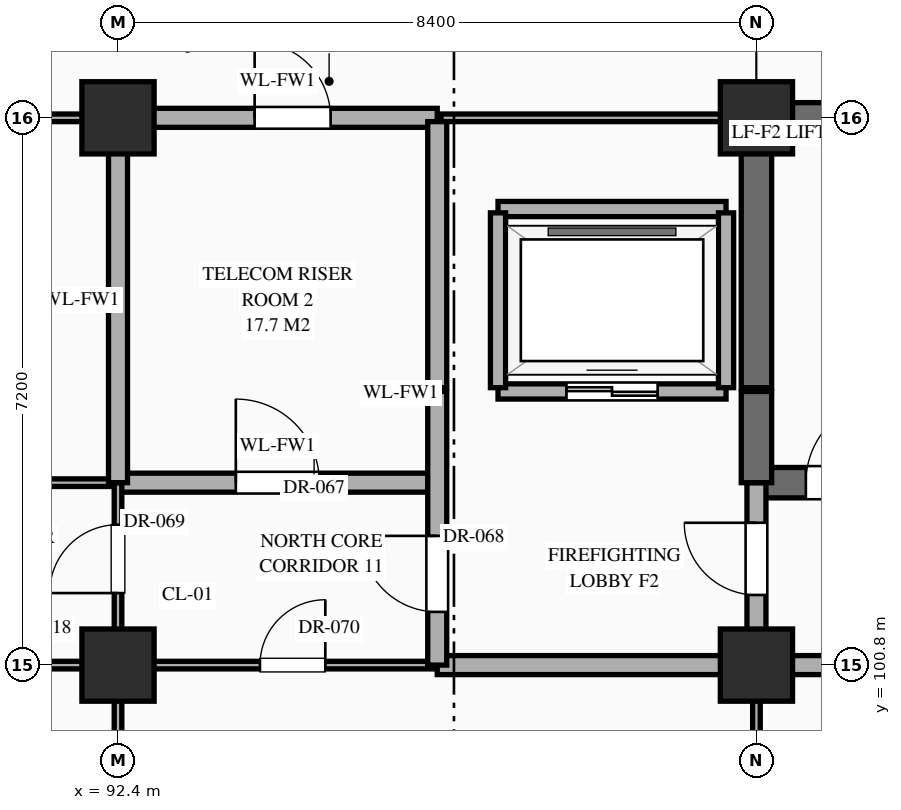
"""IFC4 building model, lengths in metres.
Left out: names, types, materials, properties, quantities, classifications, styles, units other than length and angle.
Written with IfcOpenShell. Run it as: python <this file> out.ifc"""

import sys

from ifc_helpers import new_model, si_unit, direction, frame, frame_2d, origin, origin_2d, place, context, subcontext, project, spatial, rectangle, extrude, element, fill, save


model = new_model("IFC4")
c1 = context("Model", 3, precision=1e-05, world=origin(), true_north=direction((0.0, 1.0)))
c2 = subcontext(c1, "Body", "Model", "MODEL_VIEW")
j1 = project(units=[si_unit("LENGTHUNIT", "METRE"), si_unit("PLANEANGLEUNIT", "RADIAN")], contexts=[c1])
p1 = place(None, origin())
s1 = spatial("IfcSite", under=j1, at=p1, CompositionType="ELEMENT")
p2 = place(p1, origin())
s2 = spatial("IfcBuilding", under=s1, at=p2, CompositionType="ELEMENT")
p3 = place(p2, frame((0.0, 0.0, -10.2)))
s3 = spatial("IfcBuildingStorey", under=s2, at=p3, CompositionType="ELEMENT", Elevation=-10.2)
for number, where, z_axis, x_axis in (
    (1, (92.4, 100.8, 0.0), (0.0, 0.0, 1.0), (1.0, 0.0, 0.0)),
    (2, (92.4, 108.0, 0.0), (0.0, 0.0, 1.0), (1.0, 0.0, 0.0)),
    (3, (100.8, 100.8, 0.0), (0.0, 0.0, 1.0), (1.0, 0.0, 0.0)),
    (4, (100.8, 108.0, 0.0), (0.0, 0.0, 1.0), (1.0, 0.0, 0.0)),
):
    element("IfcColumn", number, at=place(p3, frame(where, z_axis=z_axis, x_axis=x_axis)), inside=s3, PredefinedType="COLUMN", context=c2, shape_type="SweptSolid", body=[
        extrude(rectangle(XDim=0.95, YDim=0.95, at=origin_2d()), origin(), (0.0, 0.0, 1.0), 4.8),
    ])
p4 = place(p3, frame((71.4, 100.8, 0.0), z_axis=(0.0, 0.0, 1.0), x_axis=(1.0, 0.0, 0.0)))
e5 = element("IfcWall", 5, at=p4, inside=s3, PredefinedType="STANDARD", context=c2, shape_type="SweptSolid", body=[
    extrude(rectangle(XDim=25.2, YDim=0.1, at=frame_2d((12.6, 0.0))), origin(), (0.0, 0.0, 1.0), 3.63),
])
p5 = place(p4, frame((1.413, 0.0, 0.0)))
e6 = element("IfcOpeningElement", 6, at=p5, cuts=e5, PredefinedType="OPENING", context=c2, shape_type="SweptSolid", body=[
    extrude(rectangle(XDim=0.98, YDim=2.35, at=frame_2d((0.49, 1.175))), frame((0.0, 0.062, 0.0), z_axis=(0.0, -1.0, 0.0), x_axis=(1.0, 0.0, 0.0)), (0.0, 0.0, 1.0), 0.124),
])
p6 = place(p4, frame((22.867, 0.0, 0.0)))
e7 = element("IfcOpeningElement", 7, at=p6, cuts=e5, PredefinedType="OPENING", context=c2, shape_type="SweptSolid", body=[
    extrude(rectangle(XDim=0.86, YDim=2.1, at=frame_2d((0.43, 1.05))), frame((0.0, 0.062, 0.0), z_axis=(0.0, -1.0, 0.0), x_axis=(1.0, 0.0, 0.0)), (0.0, 0.0, 1.0), 0.124),
])
p7 = place(p4, frame((7.84, 0.0, 0.0)))
e8 = element("IfcOpeningElement", 8, at=p7, cuts=e5, PredefinedType="OPENING", context=c2, shape_type="SweptSolid", body=[
    extrude(rectangle(XDim=1.12, YDim=2.25, at=frame_2d((0.56, 1.125))), frame((0.0, 0.062, 0.0), z_axis=(0.0, -1.0, 0.0), x_axis=(1.0, 0.0, 0.0)), (0.0, 0.0, 1.0), 0.124),
])
p8 = place(p4, frame((14.008, 0.0, 0.0)))
e9 = element("IfcOpeningElement", 9, at=p8, cuts=e5, PredefinedType="OPENING", context=c2, shape_type="SweptSolid", body=[
    extrude(rectangle(XDim=0.98, YDim=2.35, at=frame_2d((0.49, 1.175))), frame((0.0, 0.062, 0.0), z_axis=(0.0, -1.0, 0.0), x_axis=(1.0, 0.0, 0.0)), (0.0, 0.0, 1.0), 0.124),
])
p9 = place(p4, frame((16.69, 0.0, 0.0)))
e10 = element("IfcOpeningElement", 10, at=p9, cuts=e5, PredefinedType="OPENING", context=c2, shape_type="SweptSolid", body=[
    extrude(rectangle(XDim=1.02, YDim=2.4, at=frame_2d((0.51, 1.2))), frame((0.0, 0.062, 0.0), z_axis=(0.0, -1.0, 0.0), x_axis=(1.0, 0.0, 0.0)), (0.0, 0.0, 1.0), 0.124),
])
p10 = place(p4, frame((18.972, 0.0, 0.0)))
e11 = element("IfcOpeningElement", 11, at=p10, cuts=e5, PredefinedType="OPENING", context=c2, shape_type="SweptSolid", body=[
    extrude(rectangle(XDim=1.06, YDim=2.4, at=frame_2d((0.53, 1.2))), frame((0.0, 0.062, 0.0), z_axis=(0.0, -1.0, 0.0), x_axis=(1.0, 0.0, 0.0)), (0.0, 0.0, 1.0), 0.124),
])
p11 = place(p3, frame((96.6, 100.8, 0.0), z_axis=(0.0, 0.0, 1.0), x_axis=(1.0, 0.0, 0.0)))
e12 = element("IfcWall", 12, at=p11, inside=s3, PredefinedType="STANDARD", context=c2, shape_type="SweptSolid", body=[
    extrude(rectangle(XDim=12.6, YDim=0.25, at=frame_2d((6.3, 0.0))), origin(), (0.0, 0.0, 1.0), 3.63),
])
p12 = place(p11, frame((7.9, 0.0, 0.0)))
e13 = element("IfcOpeningElement", 13, at=p12, cuts=e12, PredefinedType="OPENING", context=c2, shape_type="SweptSolid", body=[
    extrude(rectangle(XDim=1.0, YDim=2.2, at=frame_2d((0.5, 1.1))), frame((0.0, 0.137, 0.0), z_axis=(0.0, -1.0, 0.0), x_axis=(1.0, 0.0, 0.0)), (0.0, 0.0, 1.0), 0.274),
])
p13 = place(p3, frame((75.6, 103.2, 0.0), z_axis=(0.0, 0.0, 1.0), x_axis=(1.0, 0.0, 0.0)))
e14 = element("IfcWall", 14, at=p13, inside=s3, PredefinedType="STANDARD", context=c2, shape_type="SweptSolid", body=[
    extrude(rectangle(XDim=16.8, YDim=0.1, at=frame_2d((8.4, 0.0))), origin(), (0.0, 0.0, 1.0), 4.48),
])
p14 = place(p13, frame((0.88, 0.0, 0.0)))
e15 = element("IfcOpeningElement", 15, at=p14, cuts=e14, PredefinedType="OPENING", context=c2, shape_type="SweptSolid", body=[
    extrude(rectangle(XDim=1.04, YDim=2.2, at=frame_2d((0.52, 1.1))), frame((0.0, 0.062, 0.0), z_axis=(0.0, -1.0, 0.0), x_axis=(1.0, 0.0, 0.0)), (0.0, 0.0, 1.0), 0.124),
])
p15 = place(p13, frame((3.62, 0.0, 0.0)))
e16 = element("IfcOpeningElement", 16, at=p15, cuts=e14, PredefinedType="OPENING", context=c2, shape_type="SweptSolid", body=[
    extrude(rectangle(XDim=1.16, YDim=2.3, at=frame_2d((0.58, 1.15))), frame((0.0, 0.062, 0.0), z_axis=(0.0, -1.0, 0.0), x_axis=(1.0, 0.0, 0.0)), (0.0, 0.0, 1.0), 0.124),
])
p16 = place(p13, frame((6.4, 0.0, 0.0)))
e17 = element("IfcOpeningElement", 17, at=p16, cuts=e14, PredefinedType="OPENING", context=c2, shape_type="SweptSolid", body=[
    extrude(rectangle(XDim=1.2, YDim=2.35, at=frame_2d((0.6, 1.175))), frame((0.0, 0.062, 0.0), z_axis=(0.0, -1.0, 0.0), x_axis=(1.0, 0.0, 0.0)), (0.0, 0.0, 1.0), 0.124),
])
p17 = place(p13, frame((12.13, 0.0, 0.0)))
e18 = element("IfcOpeningElement", 18, at=p17, cuts=e14, PredefinedType="OPENING", context=c2, shape_type="SweptSolid", body=[
    extrude(rectangle(XDim=0.94, YDim=2.3, at=frame_2d((0.47, 1.15))), frame((0.0, 0.062, 0.0), z_axis=(0.0, -1.0, 0.0), x_axis=(1.0, 0.0, 0.0)), (0.0, 0.0, 1.0), 0.124),
])
p18 = place(p3, frame((92.4, 103.2, 0.0), z_axis=(0.0, 0.0, 1.0), x_axis=(1.0, 0.0, 0.0)))
e19 = element("IfcWall", 19, at=p18, inside=s3, PredefinedType="STANDARD", context=c2, shape_type="SweptSolid", body=[
    extrude(rectangle(XDim=4.2, YDim=0.25, at=frame_2d((2.1, 0.0))), origin(), (0.0, 0.0, 1.0), 4.48),
])
p19 = place(p18, frame((1.55, 0.0, 0.0)))
e20 = element("IfcOpeningElement", 20, at=p19, cuts=e19, PredefinedType="OPENING", context=c2, shape_type="SweptSolid", body=[
    extrude(rectangle(XDim=1.1, YDim=2.2, at=frame_2d((0.55, 1.1))), frame((0.0, 0.137, 0.0), z_axis=(0.0, -1.0, 0.0), x_axis=(1.0, 0.0, 0.0)), (0.0, 0.0, 1.0), 0.274),
])
p20 = place(p3, frame((100.8, 103.2, 0.0), z_axis=(0.0, 0.0, 1.0), x_axis=(1.0, 0.0, 0.0)))
e21 = element("IfcWall", 21, at=p20, inside=s3, PredefinedType="SHEAR", context=c2, shape_type="SweptSolid", body=[
    extrude(rectangle(XDim=8.4, YDim=0.4, at=frame_2d((4.2, 0.0))), origin(), (0.0, 0.0, 1.0), 4.48),
])
p21 = place(p20, frame((0.65, 0.0, 0.0)))
e22 = element("IfcOpeningElement", 22, at=p21, cuts=e21, PredefinedType="OPENING", context=c2, shape_type="SweptSolid", body=[
    extrude(rectangle(XDim=1.1, YDim=2.2, at=frame_2d((0.55, 1.1))), frame((0.0, 0.212, 0.0), z_axis=(0.0, -1.0, 0.0), x_axis=(1.0, 0.0, 0.0)), (0.0, 0.0, 1.0), 0.424),
])
p22 = place(p3, frame((97.4, 104.4, 0.0), z_axis=(0.0, 0.0, 1.0), x_axis=(1.0, 0.0, 0.0)))
e23 = element("IfcWall", 23, at=p22, inside=s3, PredefinedType="STANDARD", context=c2, shape_type="SweptSolid", body=[
    extrude(rectangle(XDim=3.0, YDim=0.2, at=frame_2d((1.5, 0.0))), origin(), (0.0, 0.0, 1.0), 4.48),
])
p23 = place(p22, frame((0.9, 0.0, 0.0)))
e24 = element("IfcOpeningElement", 24, at=p23, cuts=e23, PredefinedType="OPENING", context=c2, shape_type="SweptSolid", body=[
    extrude(rectangle(XDim=1.2, YDim=2.15, at=frame_2d((0.6, 1.075))), frame((0.0, 0.112, 0.0), z_axis=(0.0, -1.0, 0.0), x_axis=(1.0, 0.0, 0.0)), (0.0, 0.0, 1.0), 0.224),
])
p24 = place(p3, frame((97.4, 106.8, 0.0), z_axis=(0.0, 0.0, 1.0), x_axis=(1.0, 0.0, 0.0)))
e25 = element("IfcWall", 25, at=p24, inside=s3, PredefinedType="STANDARD", context=c2, shape_type="SweptSolid", body=[
    extrude(rectangle(XDim=3.0, YDim=0.2, at=frame_2d((1.5, 0.0))), origin(), (0.0, 0.0, 1.0), 4.48),
])
p25 = place(p3, frame((75.6, 108.0, 0.0), z_axis=(0.0, 0.0, 1.0), x_axis=(1.0, 0.0, 0.0)))
e26 = element("IfcWall", 26, at=p25, inside=s3, PredefinedType="STANDARD", context=c2, shape_type="SweptSolid", body=[
    extrude(rectangle(XDim=16.8, YDim=0.1, at=frame_2d((8.4, 0.0))), origin(), (0.0, 0.0, 1.0), 3.63),
])
p26 = place(p25, frame((0.958, 0.0, 0.0)))
e27 = element("IfcOpeningElement", 27, at=p26, cuts=e26, PredefinedType="OPENING", context=c2, shape_type="SweptSolid", body=[
    extrude(rectangle(XDim=1.28, YDim=2.35, at=frame_2d((0.64, 1.175))), frame((0.0, 0.062, 0.0), z_axis=(0.0, -1.0, 0.0), x_axis=(1.0, 0.0, 0.0)), (0.0, 0.0, 1.0), 0.124),
])
p27 = place(p25, frame((12.03, 0.0, 0.0)))
e28 = element("IfcOpeningElement", 28, at=p27, cuts=e26, PredefinedType="OPENING", context=c2, shape_type="SweptSolid", body=[
    extrude(rectangle(XDim=1.14, YDim=2.4, at=frame_2d((0.57, 1.2))), frame((0.0, 0.062, 0.0), z_axis=(0.0, -1.0, 0.0), x_axis=(1.0, 0.0, 0.0)), (0.0, 0.0, 1.0), 0.124),
])
p28 = place(p25, frame((3.62, 0.0, 0.0)))
e29 = element("IfcOpeningElement", 29, at=p28, cuts=e26, PredefinedType="OPENING", context=c2, shape_type="SweptSolid", body=[
    extrude(rectangle(XDim=1.16, YDim=2.3, at=frame_2d((0.58, 1.15))), frame((0.0, 0.062, 0.0), z_axis=(0.0, -1.0, 0.0), x_axis=(1.0, 0.0, 0.0)), (0.0, 0.0, 1.0), 0.124),
])
p29 = place(p25, frame((6.202, 0.0, 0.0)))
e30 = element("IfcOpeningElement", 30, at=p29, cuts=e26, PredefinedType="OPENING", context=c2, shape_type="SweptSolid", body=[
    extrude(rectangle(XDim=1.2, YDim=2.35, at=frame_2d((0.6, 1.175))), frame((0.0, 0.062, 0.0), z_axis=(0.0, -1.0, 0.0), x_axis=(1.0, 0.0, 0.0)), (0.0, 0.0, 1.0), 0.124),
])
p30 = place(p3, frame((92.4, 108.0, 0.0), z_axis=(0.0, 0.0, 1.0), x_axis=(1.0, 0.0, 0.0)))
e31 = element("IfcWall", 31, at=p30, inside=s3, PredefinedType="STANDARD", context=c2, shape_type="SweptSolid", body=[
    extrude(rectangle(XDim=4.2, YDim=0.25, at=frame_2d((2.1, 0.0))), origin(), (0.0, 0.0, 1.0), 3.63),
])
p31 = place(p30, frame((1.798, 0.0, 0.0)))
e32 = element("IfcOpeningElement", 32, at=p31, cuts=e31, PredefinedType="OPENING", context=c2, shape_type="SweptSolid", body=[
    extrude(rectangle(XDim=1.0, YDim=2.2, at=frame_2d((0.5, 1.1))), frame((0.0, 0.137, 0.0), z_axis=(0.0, -1.0, 0.0), x_axis=(1.0, 0.0, 0.0)), (0.0, 0.0, 1.0), 0.274),
])
p32 = place(p3, frame((96.65, 108.0, 0.0), z_axis=(0.0, 0.0, 1.0), x_axis=(1.0, 0.0, 0.0)))
e33 = element("IfcWall", 33, at=p32, inside=s3, PredefinedType="STANDARD", context=c2, shape_type="SweptSolid", body=[
    extrude(rectangle(XDim=4.1, YDim=0.1, at=frame_2d((2.05, 0.0))), origin(), (0.0, 0.0, 1.0), 3.63),
])
p33 = place(p3, frame((100.8, 108.0, 0.0), z_axis=(0.0, 0.0, 1.0), x_axis=(1.0, 0.0, 0.0)))
e34 = element("IfcWall", 34, at=p33, inside=s3, PredefinedType="SHEAR", context=c2, shape_type="SweptSolid", body=[
    extrude(rectangle(XDim=8.4, YDim=0.4, at=frame_2d((4.2, 0.0))), origin(), (0.0, 0.0, 1.0), 4.48),
])
p34 = place(p3, frame((92.4, 96.0, 0.0), z_axis=(0.0, 0.0, 1.0), x_axis=(0.0, 1.0, 0.0)))
e35 = element("IfcWall", 35, at=p34, inside=s3, PredefinedType="STANDARD", context=c2, shape_type="SweptSolid", body=[
    extrude(rectangle(XDim=7.2, YDim=0.1, at=frame_2d((3.6, 0.0))), origin(), (0.0, 0.0, 1.0), 3.73),
])
p35 = place(p34, frame((5.748, 0.0, 0.0)))
e36 = element("IfcOpeningElement", 36, at=p35, cuts=e35, PredefinedType="OPENING", context=c2, shape_type="SweptSolid", body=[
    extrude(rectangle(XDim=0.9, YDim=2.15, at=frame_2d((0.45, 1.075))), frame((0.0, 0.062, 0.0), z_axis=(0.0, -1.0, 0.0), x_axis=(1.0, 0.0, 0.0)), (0.0, 0.0, 1.0), 0.124),
])
p36 = place(p3, frame((92.4, 103.2, 0.0), z_axis=(0.0, 0.0, 1.0), x_axis=(0.0, 1.0, 0.0)))
e37 = element("IfcWall", 37, at=p36, inside=s3, PredefinedType="STANDARD", context=c2, shape_type="SweptSolid", body=[
    extrude(rectangle(XDim=4.8, YDim=0.25, at=frame_2d((2.4, 0.0))), origin(), (0.0, 0.0, 1.0), 3.73),
])
p37 = place(p3, frame((96.6, 100.8, 0.0), z_axis=(0.0, 0.0, 1.0), x_axis=(0.0, 1.0, 0.0)))
e38 = element("IfcWall", 38, at=p37, inside=s3, PredefinedType="STANDARD", context=c2, shape_type="SweptSolid", body=[
    extrude(rectangle(XDim=3.6, YDim=0.25, at=frame_2d((1.8, 0.0))), origin(), (0.0, 0.0, 1.0), 4.48),
])
p38 = place(p37, frame((0.7, 0.0, 0.0)))
e39 = element("IfcOpeningElement", 39, at=p38, cuts=e38, PredefinedType="OPENING", context=c2, shape_type="SweptSolid", body=[
    extrude(rectangle(XDim=1.0, YDim=2.2, at=frame_2d((0.5, 1.1))), frame((0.0, 0.137, 0.0), z_axis=(0.0, -1.0, 0.0), x_axis=(1.0, 0.0, 0.0)), (0.0, 0.0, 1.0), 0.274),
])
p39 = place(p3, frame((96.6, 104.45, 0.0), z_axis=(0.0, 0.0, 1.0), x_axis=(0.0, 1.0, 0.0)))
e40 = element("IfcWall", 40, at=p39, inside=s3, PredefinedType="STANDARD", context=c2, shape_type="SweptSolid", body=[
    extrude(rectangle(XDim=3.5, YDim=0.25, at=frame_2d((1.75, 0.0))), origin(), (0.0, 0.0, 1.0), 4.48),
])
for number, where, z_axis, x_axis in (
    (41, (97.4, 104.45, 0.0), (0.0, 0.0, 1.0), (0.0, 1.0, 0.0)),
    (42, (100.4, 104.45, 0.0), (0.0, 0.0, 1.0), (0.0, 1.0, 0.0)),
):
    element("IfcWall", number, at=place(p3, frame(where, z_axis=z_axis, x_axis=x_axis)), inside=s3, PredefinedType="STANDARD", context=c2, shape_type="SweptSolid", body=[
        extrude(rectangle(XDim=2.3, YDim=0.2, at=frame_2d((1.15, 0.0))), origin(), (0.0, 0.0, 1.0), 4.48),
    ])
p40 = place(p3, frame((100.8, 96.0, 0.0), z_axis=(0.0, 0.0, 1.0), x_axis=(0.0, 1.0, 0.0)))
e43 = element("IfcWall", 43, at=p40, inside=s3, PredefinedType="STANDARD", context=c2, shape_type="SweptSolid", body=[
    extrude(rectangle(XDim=4.8, YDim=0.1, at=frame_2d((2.4, 0.0))), origin(), (0.0, 0.0, 1.0), 3.73),
])
p41 = place(p3, frame((100.8, 100.8, 0.0), z_axis=(0.0, 0.0, 1.0), x_axis=(0.0, 1.0, 0.0)))
e44 = element("IfcWall", 44, at=p41, inside=s3, PredefinedType="STANDARD", context=c2, shape_type="SweptSolid", body=[
    extrude(rectangle(XDim=2.4, YDim=0.25, at=frame_2d((1.2, 0.0))), origin(), (0.0, 0.0, 1.0), 3.73),
])
p42 = place(p41, frame((0.923, 0.0, 0.0)))
e45 = element("IfcOpeningElement", 45, at=p42, cuts=e44, PredefinedType="OPENING", context=c2, shape_type="SweptSolid", body=[
    extrude(rectangle(XDim=0.95, YDim=2.15, at=frame_2d((0.475, 1.075))), frame((0.0, 0.137, 0.0), z_axis=(0.0, -1.0, 0.0), x_axis=(1.0, 0.0, 0.0)), (0.0, 0.0, 1.0), 0.274),
])
p43 = place(p3, frame((100.8, 103.2, 0.0), z_axis=(0.0, 0.0, 1.0), x_axis=(0.0, 1.0, 0.0)))
e46 = element("IfcWall", 46, at=p43, inside=s3, PredefinedType="SHEAR", context=c2, shape_type="SweptSolid", body=[
    extrude(rectangle(XDim=1.2, YDim=0.4, at=frame_2d((0.6, 0.0))), origin(), (0.0, 0.0, 1.0), 4.48),
])
p44 = place(p3, frame((100.8, 104.45, 0.0), z_axis=(0.0, 0.0, 1.0), x_axis=(0.0, 1.0, 0.0)))
e47 = element("IfcWall", 47, at=p44, inside=s3, PredefinedType="SHEAR", context=c2, shape_type="SweptSolid", body=[
    extrude(rectangle(XDim=3.5, YDim=0.4, at=frame_2d((1.75, 0.0))), origin(), (0.0, 0.0, 1.0), 4.48),
])
p45 = place(p23, origin())
e48 = element("IfcDoor", 48, at=p45, inside=s3, OperationType="DOUBLE_DOOR_SLIDING", PredefinedType="DOOR", context=c2, shape_type="SweptSolid", body=[
    extrude(rectangle(XDim=1.2, YDim=2.15, at=frame_2d((0.6, 1.075))), frame((0.0, 0.025, 0.0), z_axis=(0.0, -1.0, 0.0), x_axis=(1.0, 0.0, 0.0)), (0.0, 0.0, 1.0), 0.05),
])
fill(e24, e48)
p46 = place(p21, origin())
e49 = element("IfcDoor", 49, at=p46, inside=s3, OperationType="SINGLE_SWING_RIGHT", PredefinedType="DOOR", context=c2, shape_type="SweptSolid", body=[
    extrude(rectangle(XDim=1.1, YDim=2.2, at=frame_2d((0.55, 1.1))), frame((0.0, 0.025, 0.0), z_axis=(0.0, -1.0, 0.0), x_axis=(1.0, 0.0, 0.0)), (0.0, 0.0, 1.0), 0.05),
])
fill(e22, e49)
p47 = place(p42, origin())
e50 = element("IfcDoor", 50, at=p47, inside=s3, OperationType="SINGLE_SWING_RIGHT", PredefinedType="DOOR", context=c2, shape_type="SweptSolid", body=[
    extrude(rectangle(XDim=0.95, YDim=2.15, at=frame_2d((0.475, 1.075))), frame((0.0, 0.025, 0.0), z_axis=(0.0, -1.0, 0.0), x_axis=(1.0, 0.0, 0.0)), (0.0, 0.0, 1.0), 0.05),
])
fill(e45, e50)
p48 = place(p19, origin())
e51 = element("IfcDoor", 51, at=p48, inside=s3, OperationType="SINGLE_SWING_LEFT", PredefinedType="DOOR", context=c2, shape_type="SweptSolid", body=[
    extrude(rectangle(XDim=1.1, YDim=2.2, at=frame_2d((0.55, 1.1))), frame((0.0, 0.025, 0.0), z_axis=(0.0, -1.0, 0.0), x_axis=(1.0, 0.0, 0.0)), (0.0, 0.0, 1.0), 0.05),
])
fill(e20, e51)
p49 = place(p38, origin())
e52 = element("IfcDoor", 52, at=p49, inside=s3, OperationType="SINGLE_SWING_RIGHT", PredefinedType="DOOR", context=c2, shape_type="SweptSolid", body=[
    extrude(rectangle(XDim=1.0, YDim=2.2, at=frame_2d((0.5, 1.1))), frame((0.0, 0.025, 0.0), z_axis=(0.0, -1.0, 0.0), x_axis=(1.0, 0.0, 0.0)), (0.0, 0.0, 1.0), 0.05),
])
fill(e39, e52)
p50 = place(p35, origin())
e53 = element("IfcDoor", 53, at=p50, inside=s3, OperationType="SINGLE_SWING_LEFT", PredefinedType="DOOR", context=c2, shape_type="SweptSolid", body=[
    extrude(rectangle(XDim=0.9, YDim=2.15, at=frame_2d((0.45, 1.075))), frame((0.0, 0.025, 0.0), z_axis=(0.0, -1.0, 0.0), x_axis=(1.0, 0.0, 0.0)), (0.0, 0.0, 1.0), 0.05),
])
fill(e36, e53)
p51 = place(p6, origin())
e54 = element("IfcDoor", 54, at=p51, inside=s3, OperationType="SINGLE_SWING_RIGHT", PredefinedType="DOOR", context=c2, shape_type="SweptSolid", body=[
    extrude(rectangle(XDim=0.86, YDim=2.1, at=frame_2d((0.43, 1.05))), frame((0.0, 0.025, 0.0), z_axis=(0.0, -1.0, 0.0), x_axis=(1.0, 0.0, 0.0)), (0.0, 0.0, 1.0), 0.05),
])
fill(e7, e54)
p52 = place(p31, origin())
e55 = element("IfcDoor", 55, at=p52, inside=s3, OperationType="SINGLE_SWING_LEFT", PredefinedType="DOOR", context=c2, shape_type="SweptSolid", body=[
    extrude(rectangle(XDim=1.0, YDim=2.2, at=frame_2d((0.5, 1.1))), frame((0.0, 0.025, 0.0), z_axis=(0.0, -1.0, 0.0), x_axis=(1.0, 0.0, 0.0)), (0.0, 0.0, 1.0), 0.05),
])
fill(e32, e55)
save(model, sys.argv[1])
